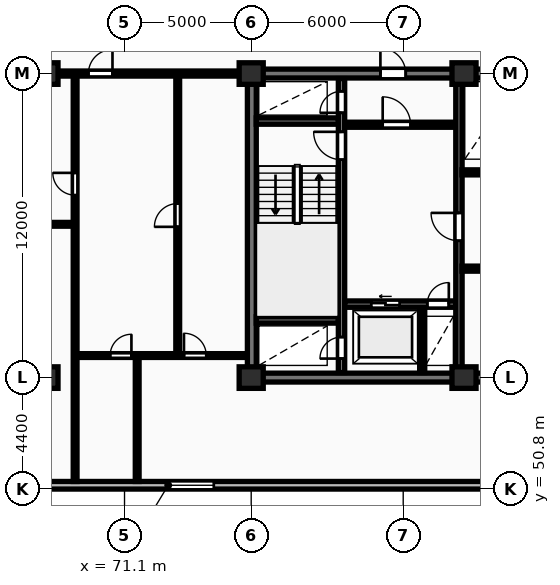
"""IFC4 building model, lengths in metres.
Left out: names, types, materials, properties, quantities, classifications, styles, units other than length and angle.
Written with IfcOpenShell. Run it as: python <this file> out.ifc"""

import sys

from ifc_helpers import new_model, si_unit, direction, frame, frame_2d, origin, origin_2d, place, context, subcontext, project, spatial, rectangle, extrude, element, fill, save


model = new_model("IFC4")
c1 = context("Model", 3, precision=1e-05, world=origin(), true_north=direction((0.0, 1.0)))
c2 = subcontext(c1, "Body", "Model", "MODEL_VIEW")
j1 = project(units=[si_unit("LENGTHUNIT", "METRE"), si_unit("PLANEANGLEUNIT", "RADIAN")], contexts=[c1])
p1 = place(None, origin())
s1 = spatial("IfcSite", under=j1, at=p1, CompositionType="ELEMENT")
p2 = place(p1, origin())
s2 = spatial("IfcBuilding", under=s1, at=p2, CompositionType="ELEMENT")
p3 = place(p2, frame((0.0, 0.0, 119.8)))
s3 = spatial("IfcBuildingStorey", under=s2, at=p3, CompositionType="ELEMENT", Elevation=119.8)
for number, where, z_axis, x_axis in (
    (1, (68.0, 55.2, 0.0), (0.0, 0.0, 1.0), (1.0, 0.0, 0.0)),
    (2, (68.0, 67.2, 0.0), (0.0, 0.0, 1.0), (1.0, 0.0, 0.0)),
    (3, (76.1, 55.2, 0.0), (0.0, 0.0, 1.0), (1.0, 0.0, 0.0)),
    (4, (76.1, 67.2, 0.0), (0.0, 0.0, 1.0), (1.0, 0.0, 0.0)),
    (5, (84.5, 55.2, 0.0), (0.0, 0.0, 1.0), (1.0, 0.0, 0.0)),
    (6, (84.5, 67.2, 0.0), (0.0, 0.0, 1.0), (1.0, 0.0, 0.0)),
):
    element("IfcColumn", number, at=place(p3, frame(where, z_axis=z_axis, x_axis=x_axis)), inside=s3, PredefinedType="COLUMN", context=c2, shape_type="SweptSolid", body=[
        extrude(rectangle(XDim=0.95, YDim=0.85, at=origin_2d()), origin(), (0.0, 0.0, 1.0), 3.25),
    ])
p4 = place(p3, frame((57.6, 50.95, 0.0), z_axis=(0.0, 0.0, 1.0), x_axis=(1.0, 0.0, 0.0)))
e7 = element("IfcWall", 7, at=p4, inside=s3, PredefinedType="STANDARD", context=c2, shape_type="SweptSolid", body=[
    extrude(rectangle(XDim=73.0, YDim=0.3, at=frame_2d((36.5, 0.0))), origin(), (0.0, 0.0, 1.0), 2.97),
])
p5 = place(p4, frame((15.225, 0.0, 0.85)))
e8 = element("IfcOpeningElement", 8, at=p5, cuts=e7, PredefinedType="OPENING", context=c2, shape_type="SweptSolid", body=[
    extrude(rectangle(XDim=1.8, YDim=1.8, at=frame_2d((0.9, 0.9))), frame((0.0, 0.16, 0.0), z_axis=(0.0, -1.0, 0.0), x_axis=(1.0, 0.0, 0.0)), (0.0, 0.0, 1.0), 0.32),
])
p6 = place(p4, frame((58.575, 0.0, 0.85)))
e9 = element("IfcOpeningElement", 9, at=p6, cuts=e7, PredefinedType="OPENING", context=c2, shape_type="SweptSolid", body=[
    extrude(rectangle(XDim=1.8, YDim=1.8, at=frame_2d((0.9, 0.9))), frame((0.0, 0.16, 0.0), z_axis=(0.0, -1.0, 0.0), x_axis=(1.0, 0.0, 0.0)), (0.0, 0.0, 1.0), 0.32),
])
p7 = place(p3, frame((75.95, 55.2, 0.0), z_axis=(0.0, 0.0, 1.0), x_axis=(1.0, 0.0, 0.0)))
e10 = element("IfcWall", 10, at=p7, inside=s3, PredefinedType="SHEAR", context=c2, shape_type="SweptSolid", body=[
    extrude(rectangle(XDim=36.3, YDim=0.35, at=frame_2d((18.15, 0.0))), origin(), (0.0, 0.0, 1.0), 3.25),
])
p8 = place(p3, frame((76.125, 55.375, 0.0), z_axis=(0.0, 0.0, 1.0), x_axis=(0.0, 1.0, 0.0)))
e11 = element("IfcWall", 11, at=p8, inside=s3, PredefinedType="SHEAR", context=c2, shape_type="SweptSolid", body=[
    extrude(rectangle(XDim=11.65, YDim=0.35, at=frame_2d((5.825, 0.0))), origin(), (0.0, 0.0, 1.0), 3.25),
])
p9 = place(p3, frame((75.95, 67.2, 0.0), z_axis=(0.0, 0.0, 1.0), x_axis=(1.0, 0.0, 0.0)))
e12 = element("IfcWall", 12, at=p9, inside=s3, PredefinedType="SHEAR", context=c2, shape_type="SweptSolid", body=[
    extrude(rectangle(XDim=36.3, YDim=0.35, at=frame_2d((18.15, 0.0))), origin(), (0.0, 0.0, 1.0), 3.25),
])
p10 = place(p9, frame((5.25, 0.0, 0.0)))
e13 = element("IfcOpeningElement", 13, at=p10, cuts=e12, PredefinedType="OPENING", context=c2, shape_type="SweptSolid", body=[
    extrude(rectangle(XDim=1.0, YDim=2.15, at=frame_2d((0.5, 1.075))), frame((0.0, 0.185, 0.0), z_axis=(0.0, -1.0, 0.0), x_axis=(1.0, 0.0, 0.0)), (0.0, 0.0, 1.0), 0.37),
])
p11 = place(p9, frame((21.6, 0.0, 0.0)))
e14 = element("IfcOpeningElement", 14, at=p11, cuts=e12, PredefinedType="OPENING", context=c2, shape_type="SweptSolid", body=[
    extrude(rectangle(XDim=1.5, YDim=2.2, at=frame_2d((0.75, 1.1))), frame((0.0, 0.185, 0.0), z_axis=(0.0, -1.0, 0.0), x_axis=(1.0, 0.0, 0.0)), (0.0, 0.0, 1.0), 0.37),
])
p12 = place(p9, frame((30.45, 0.0, 0.0)))
e15 = element("IfcOpeningElement", 15, at=p12, cuts=e12, PredefinedType="OPENING", context=c2, shape_type="SweptSolid", body=[
    extrude(rectangle(XDim=1.0, YDim=2.15, at=frame_2d((0.5, 1.075))), frame((0.0, 0.185, 0.0), z_axis=(0.0, -1.0, 0.0), x_axis=(1.0, 0.0, 0.0)), (0.0, 0.0, 1.0), 0.37),
])
p13 = place(p3, frame((79.665, 55.4, 0.0), z_axis=(0.0, 0.0, 1.0), x_axis=(0.0, 1.0, 0.0)))
e16 = element("IfcWall", 16, at=p13, inside=s3, PredefinedType="SHEAR", context=c2, shape_type="SweptSolid", body=[
    extrude(rectangle(XDim=11.6, YDim=0.25, at=frame_2d((5.8, 0.0))), origin(), (0.0, 0.0, 1.0), 3.25),
])
p14 = place(p13, frame((0.55, 0.0, 0.0)))
e17 = element("IfcOpeningElement", 17, at=p14, cuts=e16, PredefinedType="OPENING", context=c2, shape_type="SweptSolid", body=[
    extrude(rectangle(XDim=0.85, YDim=2.05, at=frame_2d((0.425, 1.025))), frame((0.0, 0.135, 0.0), z_axis=(0.0, -1.0, 0.0), x_axis=(1.0, 0.0, 0.0)), (0.0, 0.0, 1.0), 0.27),
])
p15 = place(p13, frame((8.4, 0.0, 0.0)))
e18 = element("IfcOpeningElement", 18, at=p15, cuts=e16, PredefinedType="OPENING", context=c2, shape_type="SweptSolid", body=[
    extrude(rectangle(XDim=1.1, YDim=2.1, at=frame_2d((0.55, 1.05))), frame((0.0, 0.135, 0.0), z_axis=(0.0, -1.0, 0.0), x_axis=(1.0, 0.0, 0.0)), (0.0, 0.0, 1.0), 0.27),
])
p16 = place(p13, frame((10.25, 0.0, 0.0)))
e19 = element("IfcOpeningElement", 19, at=p16, cuts=e16, PredefinedType="OPENING", context=c2, shape_type="SweptSolid", body=[
    extrude(rectangle(XDim=0.85, YDim=2.05, at=frame_2d((0.425, 1.025))), frame((0.0, 0.135, 0.0), z_axis=(0.0, -1.0, 0.0), x_axis=(1.0, 0.0, 0.0)), (0.0, 0.0, 1.0), 0.27),
])
for number, where, z_axis, x_axis in (
    (20, (76.3, 57.475, 0.0), (0.0, 0.0, 1.0), (1.0, 0.0, 0.0)),
    (21, (76.3, 65.325, 0.0), (0.0, 0.0, 1.0), (1.0, 0.0, 0.0)),
):
    element("IfcWall", number, at=place(p3, frame(where, z_axis=z_axis, x_axis=x_axis)), inside=s3, PredefinedType="SHEAR", context=c2, shape_type="SweptSolid", body=[
        extrude(rectangle(XDim=3.24, YDim=0.25, at=frame_2d((1.62, 0.0))), origin(), (0.0, 0.0, 1.0), 3.25),
    ])
p17 = place(p3, frame((79.79, 58.1, 0.0), z_axis=(0.0, 0.0, 1.0), x_axis=(1.0, 0.0, 0.0)))
e22 = element("IfcWall", 22, at=p17, inside=s3, PredefinedType="SHEAR", context=c2, shape_type="SweptSolid", body=[
    extrude(rectangle(XDim=4.39, YDim=0.25, at=frame_2d((2.195, 0.0))), origin(), (0.0, 0.0, 1.0), 3.25),
])
p18 = place(p17, frame((1.05, 0.0, 0.0)))
e23 = element("IfcOpeningElement", 23, at=p18, cuts=e22, PredefinedType="OPENING", context=c2, shape_type="SweptSolid", body=[
    extrude(rectangle(XDim=1.12, YDim=2.12, at=frame_2d((0.56, 1.06))), frame((0.0, 0.135, 0.0), z_axis=(0.0, -1.0, 0.0), x_axis=(1.0, 0.0, 0.0)), (0.0, 0.0, 1.0), 0.27),
])
p19 = place(p17, frame((3.26, 0.0, 0.0)))
e24 = element("IfcOpeningElement", 24, at=p19, cuts=e22, PredefinedType="OPENING", context=c2, shape_type="SweptSolid", body=[
    extrude(rectangle(XDim=0.85, YDim=2.05, at=frame_2d((0.425, 1.025))), frame((0.0, 0.135, 0.0), z_axis=(0.0, -1.0, 0.0), x_axis=(1.0, 0.0, 0.0)), (0.0, 0.0, 1.0), 0.27),
])
p20 = place(p3, frame((82.85, 55.4, 0.0), z_axis=(0.0, 0.0, 1.0), x_axis=(0.0, 1.0, 0.0)))
e25 = element("IfcWall", 25, at=p20, inside=s3, PredefinedType="PARTITIONING", context=c2, shape_type="SweptSolid", body=[
    extrude(rectangle(XDim=2.56, YDim=0.2, at=frame_2d((1.28, 0.0))), origin(), (0.0, 0.0, 1.0), 2.97),
])
p21 = place(p3, frame((79.79, 65.18, 0.0), z_axis=(0.0, 0.0, 1.0), x_axis=(1.0, 0.0, 0.0)))
e26 = element("IfcWall", 26, at=p21, inside=s3, PredefinedType="PARTITIONING", context=c2, shape_type="SweptSolid", body=[
    extrude(rectangle(XDim=4.39, YDim=0.2, at=frame_2d((2.195, 0.0))), origin(), (0.0, 0.0, 1.0), 2.97),
])
p22 = place(p21, frame((1.5, 0.0, 0.0)))
e27 = element("IfcOpeningElement", 27, at=p22, cuts=e26, PredefinedType="OPENING", context=c2, shape_type="SweptSolid", body=[
    extrude(rectangle(XDim=1.1, YDim=2.1, at=frame_2d((0.55, 1.05))), frame((0.0, 0.11, 0.0), z_axis=(0.0, -1.0, 0.0), x_axis=(1.0, 0.0, 0.0)), (0.0, 0.0, 1.0), 0.22),
])
p23 = place(p3, frame((84.3, 55.4, 0.0), z_axis=(0.0, 0.0, 1.0), x_axis=(0.0, 1.0, 0.0)))
e28 = element("IfcWall", 28, at=p23, inside=s3, PredefinedType="SHEAR", context=c2, shape_type="SweptSolid", body=[
    extrude(rectangle(XDim=11.6, YDim=0.25, at=frame_2d((5.8, 0.0))), origin(), (0.0, 0.0, 1.0), 3.25),
])
p24 = place(p23, frame((5.2, 0.0, 0.0)))
e29 = element("IfcOpeningElement", 29, at=p24, cuts=e28, PredefinedType="OPENING", context=c2, shape_type="SweptSolid", body=[
    extrude(rectangle(XDim=1.1, YDim=2.1, at=frame_2d((0.55, 1.05))), frame((0.0, 0.135, 0.0), z_axis=(0.0, -1.0, 0.0), x_axis=(1.0, 0.0, 0.0)), (0.0, 0.0, 1.0), 0.27),
])
p25 = place(p3, frame((84.42, 59.5, 0.0), z_axis=(0.0, 0.0, 1.0), x_axis=(1.0, 0.0, 0.0)))
e30 = element("IfcWall", 30, at=p25, inside=s3, PredefinedType="PARTITIONING", context=c2, shape_type="SweptSolid", body=[
    extrude(rectangle(XDim=8.36, YDim=0.2, at=frame_2d((4.18, 0.0))), origin(), (0.0, 0.0, 1.0), 2.97),
])
p26 = place(p25, frame((3.4, 0.0, 0.0)))
e31 = element("IfcOpeningElement", 31, at=p26, cuts=e30, PredefinedType="OPENING", context=c2, shape_type="SweptSolid", body=[
    extrude(rectangle(XDim=0.92, YDim=2.08, at=frame_2d((0.46, 1.04))), frame((0.0, 0.11, 0.0), z_axis=(0.0, -1.0, 0.0), x_axis=(1.0, 0.0, 0.0)), (0.0, 0.0, 1.0), 0.22),
])
p27 = place(p3, frame((84.42, 63.3, 0.0), z_axis=(0.0, 0.0, 1.0), x_axis=(1.0, 0.0, 0.0)))
e32 = element("IfcWall", 32, at=p27, inside=s3, PredefinedType="PARTITIONING", context=c2, shape_type="SweptSolid", body=[
    extrude(rectangle(XDim=19.83, YDim=0.2, at=frame_2d((9.915, 0.0))), origin(), (0.0, 0.0, 1.0), 2.97),
])
p28 = place(p27, frame((1.15, 0.0, 0.0)))
e33 = element("IfcOpeningElement", 33, at=p28, cuts=e32, PredefinedType="OPENING", context=c2, shape_type="SweptSolid", body=[
    extrude(rectangle(XDim=0.85, YDim=2.05, at=frame_2d((0.425, 1.025))), frame((0.0, 0.11, 0.0), z_axis=(0.0, -1.0, 0.0), x_axis=(1.0, 0.0, 0.0)), (0.0, 0.0, 1.0), 0.22),
])
p29 = place(p27, frame((3.25, 0.0, 0.0)))
e34 = element("IfcOpeningElement", 34, at=p29, cuts=e32, PredefinedType="OPENING", context=c2, shape_type="SweptSolid", body=[
    extrude(rectangle(XDim=0.85, YDim=2.05, at=frame_2d((0.425, 1.025))), frame((0.0, 0.11, 0.0), z_axis=(0.0, -1.0, 0.0), x_axis=(1.0, 0.0, 0.0)), (0.0, 0.0, 1.0), 0.22),
])
p30 = place(p27, frame((13.08, 0.0, 0.0)))
e35 = element("IfcOpeningElement", 35, at=p30, cuts=e32, PredefinedType="OPENING", context=c2, shape_type="SweptSolid", body=[
    extrude(rectangle(XDim=1.5, YDim=2.2, at=frame_2d((0.75, 1.1))), frame((0.0, 0.11, 0.0), z_axis=(0.0, -1.0, 0.0), x_axis=(1.0, 0.0, 0.0)), (0.0, 0.0, 1.0), 0.22),
])
p31 = place(p27, frame((5.53, 0.0, 0.0)))
e36 = element("IfcOpeningElement", 36, at=p31, cuts=e32, PredefinedType="OPENING", context=c2, shape_type="SweptSolid", body=[
    extrude(rectangle(XDim=0.88, YDim=2.06, at=frame_2d((0.44, 1.03))), frame((0.0, 0.11, 0.0), z_axis=(0.0, -1.0, 0.0), x_axis=(1.0, 0.0, 0.0)), (0.0, 0.0, 1.0), 0.22),
])
p32 = place(p27, frame((7.68, 0.0, 0.0)))
e37 = element("IfcOpeningElement", 37, at=p32, cuts=e32, PredefinedType="OPENING", context=c2, shape_type="SweptSolid", body=[
    extrude(rectangle(XDim=0.88, YDim=2.06, at=frame_2d((0.44, 1.03))), frame((0.0, 0.11, 0.0), z_axis=(0.0, -1.0, 0.0), x_axis=(1.0, 0.0, 0.0)), (0.0, 0.0, 1.0), 0.22),
])
p33 = place(p27, frame((10.43, 0.0, 0.0)))
e38 = element("IfcOpeningElement", 38, at=p33, cuts=e32, PredefinedType="OPENING", context=c2, shape_type="SweptSolid", body=[
    extrude(rectangle(XDim=0.85, YDim=2.05, at=frame_2d((0.425, 1.025))), frame((0.0, 0.11, 0.0), z_axis=(0.0, -1.0, 0.0), x_axis=(1.0, 0.0, 0.0)), (0.0, 0.0, 1.0), 0.22),
])
p34 = place(p27, frame((16.23, 0.0, 0.0)))
e39 = element("IfcOpeningElement", 39, at=p34, cuts=e32, PredefinedType="OPENING", context=c2, shape_type="SweptSolid", body=[
    extrude(rectangle(XDim=0.96, YDim=2.1, at=frame_2d((0.48, 1.05))), frame((0.0, 0.11, 0.0), z_axis=(0.0, -1.0, 0.0), x_axis=(1.0, 0.0, 0.0)), (0.0, 0.0, 1.0), 0.22),
])
p35 = place(p27, frame((18.68, 0.0, 0.0)))
e40 = element("IfcOpeningElement", 40, at=p35, cuts=e32, PredefinedType="OPENING", context=c2, shape_type="SweptSolid", body=[
    extrude(rectangle(XDim=0.84, YDim=2.04, at=frame_2d((0.42, 1.02))), frame((0.0, 0.11, 0.0), z_axis=(0.0, -1.0, 0.0), x_axis=(1.0, 0.0, 0.0)), (0.0, 0.0, 1.0), 0.22),
])
p36 = place(p3, frame((57.6, 61.25, 0.0), z_axis=(0.0, 0.0, 1.0), x_axis=(1.0, 0.0, 0.0)))
e41 = element("IfcWall", 41, at=p36, inside=s3, PredefinedType="PARTITIONING", context=c2, shape_type="SweptSolid", body=[
    extrude(rectangle(XDim=11.55, YDim=0.15, at=frame_2d((5.775, 0.0))), origin(), (0.0, 0.0, 1.0), 2.97),
])
p37 = place(p36, frame((5.355, 0.0, 0.0)))
e42 = element("IfcOpeningElement", 42, at=p37, cuts=e41, PredefinedType="OPENING", context=c2, shape_type="SweptSolid", body=[
    extrude(rectangle(XDim=0.84, YDim=2.04, at=frame_2d((0.42, 1.02))), frame((0.0, 0.085, 0.0), z_axis=(0.0, -1.0, 0.0), x_axis=(1.0, 0.0, 0.0)), (0.0, 0.0, 1.0), 0.17),
])
p38 = place(p3, frame((69.15, 51.1, 0.0), z_axis=(0.0, 0.0, 1.0), x_axis=(0.0, 1.0, 0.0)))
e43 = element("IfcWall", 43, at=p38, inside=s3, PredefinedType="PARTITIONING", context=c2, shape_type="SweptSolid", body=[
    extrude(rectangle(XDim=16.05, YDim=0.15, at=frame_2d((8.025, 0.0))), origin(), (0.0, 0.0, 1.0), 2.97),
])
p39 = place(p38, frame((11.3, 0.0, 0.0)))
e44 = element("IfcOpeningElement", 44, at=p39, cuts=e43, PredefinedType="OPENING", context=c2, shape_type="SweptSolid", body=[
    extrude(rectangle(XDim=0.88, YDim=2.06, at=frame_2d((0.44, 1.03))), frame((0.0, 0.085, 0.0), z_axis=(0.0, -1.0, 0.0), x_axis=(1.0, 0.0, 0.0)), (0.0, 0.0, 1.0), 0.17),
])
p40 = place(p3, frame((73.2, 56.07, 0.0), z_axis=(0.0, 0.0, 1.0), x_axis=(0.0, 1.0, 0.0)))
e45 = element("IfcWall", 45, at=p40, inside=s3, PredefinedType="PARTITIONING", context=c2, shape_type="SweptSolid", body=[
    extrude(rectangle(XDim=11.08, YDim=0.15, at=frame_2d((5.54, 0.0))), origin(), (0.0, 0.0, 1.0), 2.97),
])
p41 = place(p40, frame((5.08, 0.0, 0.0)))
e46 = element("IfcOpeningElement", 46, at=p41, cuts=e45, PredefinedType="OPENING", context=c2, shape_type="SweptSolid", body=[
    extrude(rectangle(XDim=0.92, YDim=2.08, at=frame_2d((0.46, 1.04))), frame((0.0, 0.085, 0.0), z_axis=(0.0, -1.0, 0.0), x_axis=(1.0, 0.0, 0.0)), (0.0, 0.0, 1.0), 0.17),
])
p42 = place(p3, frame((71.6, 51.1, 0.0), z_axis=(0.0, 0.0, 1.0), x_axis=(0.0, 1.0, 0.0)))
e47 = element("IfcWall", 47, at=p42, inside=s3, PredefinedType="PARTITIONING", context=c2, shape_type="SweptSolid", body=[
    extrude(rectangle(XDim=4.97, YDim=0.15, at=frame_2d((2.485, 0.0))), origin(), (0.0, 0.0, 1.0), 2.97),
])
p43 = place(p3, frame((69.17, 56.07, 0.0), z_axis=(0.0, 0.0, 1.0), x_axis=(1.0, 0.0, 0.0)))
e48 = element("IfcWall", 48, at=p43, inside=s3, PredefinedType="PARTITIONING", context=c2, shape_type="SweptSolid", body=[
    extrude(rectangle(XDim=6.76, YDim=0.15, at=frame_2d((3.38, 0.0))), origin(), (0.0, 0.0, 1.0), 2.97),
])
p44 = place(p43, frame((1.362, 0.0, 0.0)))
e49 = element("IfcOpeningElement", 49, at=p44, cuts=e48, PredefinedType="OPENING", context=c2, shape_type="SweptSolid", body=[
    extrude(rectangle(XDim=0.84, YDim=2.04, at=frame_2d((0.42, 1.02))), frame((0.0, 0.085, 0.0), z_axis=(0.0, -1.0, 0.0), x_axis=(1.0, 0.0, 0.0)), (0.0, 0.0, 1.0), 0.17),
])
p45 = place(p43, frame((4.277, 0.0, 0.0)))
e50 = element("IfcOpeningElement", 50, at=p45, cuts=e48, PredefinedType="OPENING", context=c2, shape_type="SweptSolid", body=[
    extrude(rectangle(XDim=0.88, YDim=2.06, at=frame_2d((0.44, 1.03))), frame((0.0, 0.085, 0.0), z_axis=(0.0, -1.0, 0.0), x_axis=(1.0, 0.0, 0.0)), (0.0, 0.0, 1.0), 0.17),
])
p46 = place(p3, frame((57.6, 67.2, 0.0), z_axis=(0.0, 0.0, 1.0), x_axis=(1.0, 0.0, 0.0)))
e51 = element("IfcWall", 51, at=p46, inside=s3, PredefinedType="PARTITIONING", context=c2, shape_type="SweptSolid", body=[
    extrude(rectangle(XDim=18.35, YDim=0.2, at=frame_2d((9.175, 0.0))), origin(), (0.0, 0.0, 1.0), 2.433),
])
p47 = place(p46, frame((12.075, 0.0, 0.0)))
e52 = element("IfcOpeningElement", 52, at=p47, cuts=e51, PredefinedType="OPENING", context=c2, shape_type="SweptSolid", body=[
    extrude(rectangle(XDim=0.95, YDim=2.15, at=frame_2d((0.475, 1.075))), frame((0.0, 0.11, 0.0), z_axis=(0.0, -1.0, 0.0), x_axis=(1.0, 0.0, 0.0)), (0.0, 0.0, 1.0), 0.22),
])
p48 = place(p5, origin())
e53 = element("IfcWindow", 53, at=p48, inside=s3, PartitioningType="SINGLE_PANEL", PredefinedType="WINDOW", context=c2, shape_type="SweptSolid", body=[
    extrude(rectangle(XDim=1.8, YDim=1.8, at=frame_2d((0.9, 0.9))), frame((0.0, 0.03, 0.0), z_axis=(0.0, -1.0, 0.0), x_axis=(1.0, 0.0, 0.0)), (0.0, 0.0, 1.0), 0.06),
])
fill(e8, e53)
p49 = place(p10, origin())
e54 = element("IfcDoor", 54, at=p49, inside=s3, OperationType="SINGLE_SWING_LEFT", PredefinedType="DOOR", context=c2, shape_type="SweptSolid", body=[
    extrude(rectangle(XDim=1.0, YDim=2.15, at=frame_2d((0.5, 1.075))), frame((0.0, 0.025, 0.0), z_axis=(0.0, -1.0, 0.0), x_axis=(1.0, 0.0, 0.0)), (0.0, 0.0, 1.0), 0.05),
])
fill(e13, e54)
p50 = place(p14, origin())
e55 = element("IfcDoor", 55, at=p50, inside=s3, OperationType="SINGLE_SWING_LEFT", PredefinedType="DOOR", context=c2, shape_type="SweptSolid", body=[
    extrude(rectangle(XDim=0.85, YDim=2.05, at=frame_2d((0.425, 1.025))), frame((0.0, 0.025, 0.0), z_axis=(0.0, -1.0, 0.0), x_axis=(1.0, 0.0, 0.0)), (0.0, 0.0, 1.0), 0.05),
])
fill(e17, e55)
p51 = place(p15, origin())
e56 = element("IfcDoor", 56, at=p51, inside=s3, OperationType="SINGLE_SWING_RIGHT", PredefinedType="DOOR", context=c2, shape_type="SweptSolid", body=[
    extrude(rectangle(XDim=1.1, YDim=2.1, at=frame_2d((0.55, 1.05))), frame((0.0, 0.025, 0.0), z_axis=(0.0, -1.0, 0.0), x_axis=(1.0, 0.0, 0.0)), (0.0, 0.0, 1.0), 0.05),
])
fill(e18, e56)
p52 = place(p16, origin())
e57 = element("IfcDoor", 57, at=p52, inside=s3, OperationType="SINGLE_SWING_LEFT", PredefinedType="DOOR", context=c2, shape_type="SweptSolid", body=[
    extrude(rectangle(XDim=0.85, YDim=2.05, at=frame_2d((0.425, 1.025))), frame((0.0, 0.025, 0.0), z_axis=(0.0, -1.0, 0.0), x_axis=(1.0, 0.0, 0.0)), (0.0, 0.0, 1.0), 0.05),
])
fill(e19, e57)
p53 = place(p18, origin())
e58 = element("IfcDoor", 58, at=p53, inside=s3, OperationType="SLIDING_TO_LEFT", PredefinedType="DOOR", context=c2, shape_type="SweptSolid", body=[
    extrude(rectangle(XDim=1.12, YDim=2.12, at=frame_2d((0.56, 1.06))), frame((0.0, 0.025, 0.0), z_axis=(0.0, -1.0, 0.0), x_axis=(1.0, 0.0, 0.0)), (0.0, 0.0, 1.0), 0.05),
])
fill(e23, e58)
p54 = place(p19, origin())
e59 = element("IfcDoor", 59, at=p54, inside=s3, OperationType="SINGLE_SWING_RIGHT", PredefinedType="DOOR", context=c2, shape_type="SweptSolid", body=[
    extrude(rectangle(XDim=0.85, YDim=2.05, at=frame_2d((0.425, 1.025))), frame((0.0, 0.025, 0.0), z_axis=(0.0, -1.0, 0.0), x_axis=(1.0, 0.0, 0.0)), (0.0, 0.0, 1.0), 0.05),
])
fill(e24, e59)
p55 = place(p22, origin())
e60 = element("IfcDoor", 60, at=p55, inside=s3, OperationType="SINGLE_SWING_LEFT", PredefinedType="DOOR", context=c2, shape_type="SweptSolid", body=[
    extrude(rectangle(XDim=1.1, YDim=2.1, at=frame_2d((0.55, 1.05))), frame((0.0, 0.025, 0.0), z_axis=(0.0, -1.0, 0.0), x_axis=(1.0, 0.0, 0.0)), (0.0, 0.0, 1.0), 0.05),
])
fill(e27, e60)
p56 = place(p24, origin())
e61 = element("IfcDoor", 61, at=p56, inside=s3, OperationType="SINGLE_SWING_RIGHT", PredefinedType="DOOR", context=c2, shape_type="SweptSolid", body=[
    extrude(rectangle(XDim=1.1, YDim=2.1, at=frame_2d((0.55, 1.05))), frame((0.0, 0.025, 0.0), z_axis=(0.0, -1.0, 0.0), x_axis=(1.0, 0.0, 0.0)), (0.0, 0.0, 1.0), 0.05),
])
fill(e29, e61)
p57 = place(p39, origin())
e62 = element("IfcDoor", 62, at=p57, inside=s3, OperationType="SINGLE_SWING_RIGHT", PredefinedType="DOOR", context=c2, shape_type="SweptSolid", body=[
    extrude(rectangle(XDim=0.88, YDim=2.06, at=frame_2d((0.44, 1.03))), frame((0.0, 0.025, 0.0), z_axis=(0.0, -1.0, 0.0), x_axis=(1.0, 0.0, 0.0)), (0.0, 0.0, 1.0), 0.05),
])
fill(e44, e62)
p58 = place(p41, origin())
e63 = element("IfcDoor", 63, at=p58, inside=s3, OperationType="SINGLE_SWING_LEFT", PredefinedType="DOOR", context=c2, shape_type="SweptSolid", body=[
    extrude(rectangle(XDim=0.92, YDim=2.08, at=frame_2d((0.46, 1.04))), frame((0.0, 0.025, 0.0), z_axis=(0.0, -1.0, 0.0), x_axis=(1.0, 0.0, 0.0)), (0.0, 0.0, 1.0), 0.05),
])
fill(e46, e63)
p59 = place(p44, origin())
e64 = element("IfcDoor", 64, at=p59, inside=s3, OperationType="SINGLE_SWING_RIGHT", PredefinedType="DOOR", context=c2, shape_type="SweptSolid", body=[
    extrude(rectangle(XDim=0.84, YDim=2.04, at=frame_2d((0.42, 1.02))), frame((0.0, 0.025, 0.0), z_axis=(0.0, -1.0, 0.0), x_axis=(1.0, 0.0, 0.0)), (0.0, 0.0, 1.0), 0.05),
])
fill(e49, e64)
p60 = place(p45, origin())
e65 = element("IfcDoor", 65, at=p60, inside=s3, OperationType="SINGLE_SWING_LEFT", PredefinedType="DOOR", context=c2, shape_type="SweptSolid", body=[
    extrude(rectangle(XDim=0.88, YDim=2.06, at=frame_2d((0.44, 1.03))), frame((0.0, 0.025, 0.0), z_axis=(0.0, -1.0, 0.0), x_axis=(1.0, 0.0, 0.0)), (0.0, 0.0, 1.0), 0.05),
])
fill(e50, e65)
p61 = place(p47, origin())
e66 = element("IfcDoor", 66, at=p61, inside=s3, OperationType="SINGLE_SWING_RIGHT", PredefinedType="DOOR", context=c2, shape_type="SweptSolid", body=[
    extrude(rectangle(XDim=0.95, YDim=2.15, at=frame_2d((0.475, 1.075))), frame((0.0, 0.025, 0.0), z_axis=(0.0, -1.0, 0.0), x_axis=(1.0, 0.0, 0.0)), (0.0, 0.0, 1.0), 0.05),
])
fill(e52, e66)
save(model, sys.argv[1])
